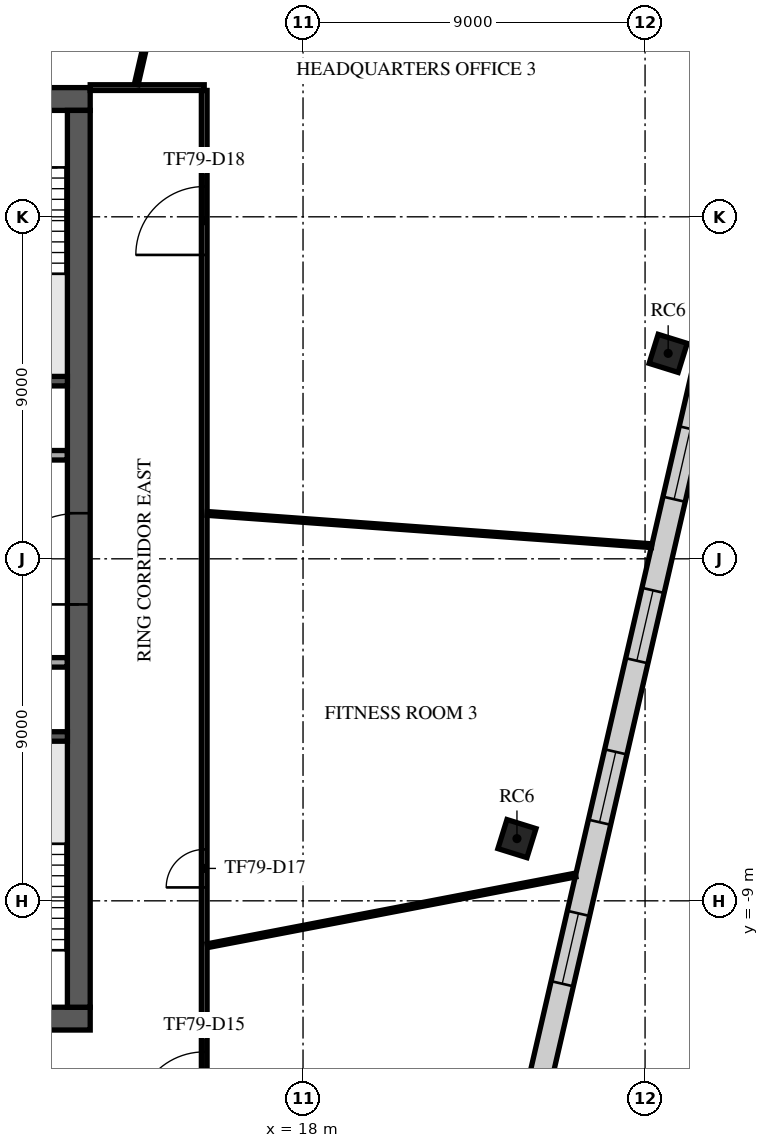
"""IFC4 building model, lengths in metres.
Left out: names, types, materials, properties, quantities, classifications, styles, units other than length and angle.
Written with IfcOpenShell. Run it as: python <this file> out.ifc"""

import sys

from ifc_helpers import new_model, si_unit, direction, frame, frame_2d, origin, origin_2d, place, context, subcontext, project, spatial, rectangle, extrude, element, fill, save


model = new_model("IFC4")
c1 = context("Model", 3, precision=1e-05, world=origin(), true_north=direction((0.0, 1.0)))
c2 = subcontext(c1, "Body", "Model", "MODEL_VIEW")
j1 = project(units=[si_unit("LENGTHUNIT", "METRE"), si_unit("PLANEANGLEUNIT", "RADIAN")], contexts=[c1])
p1 = place(None, origin())
s1 = spatial("IfcSite", under=j1, at=p1, CompositionType="ELEMENT")
p2 = place(p1, origin())
s2 = spatial("IfcBuilding", under=s1, at=p2, CompositionType="ELEMENT")
p3 = place(p2, frame((0.0, 0.0, 332.5)))
s3 = spatial("IfcBuildingStorey", under=s2, at=p3, CompositionType="ELEMENT", Elevation=332.5)
for number, where, z_axis, x_axis in (
    (1, (23.629, -7.363, 0.0), (0.0, 0.0, 1.0), (0.298, 0.955, 0.0)),
    (2, (27.608, 5.406, 0.0), (0.0, 0.0, 1.0), (0.298, 0.955, 0.0)),
):
    element("IfcColumn", number, at=place(p3, frame(where, z_axis=z_axis, x_axis=x_axis)), inside=s3, PredefinedType="COLUMN", context=c2, shape_type="SweptSolid", body=[
        extrude(rectangle(XDim=0.8, YDim=0.8, at=origin_2d()), origin(), (0.0, 0.0, 1.0), 4.0),
    ])
p4 = place(p3, frame((-12.4, 12.1, 0.0), z_axis=(0.0, 0.0, 1.0), x_axis=(1.0, 0.0, 0.0)))
e3 = element("IfcWall", 3, at=p4, inside=s3, PredefinedType="SHEAR", context=c2, shape_type="SweptSolid", body=[
    extrude(rectangle(XDim=24.8, YDim=0.6, at=frame_2d((12.4, 0.0))), origin(), (0.0, 0.0, 1.0), 3.65),
])
p5 = place(p4, frame((11.2, 0.0, 0.0)))
e4 = element("IfcOpeningElement", 4, at=p5, cuts=e3, PredefinedType="OPENING", context=c2, shape_type="SweptSolid", body=[
    extrude(rectangle(XDim=2.4, YDim=2.4, at=frame_2d((1.2, 1.2))), frame((0.0, 0.31, 0.0), z_axis=(0.0, -1.0, 0.0), x_axis=(1.0, 0.0, 0.0)), (0.0, 0.0, 1.0), 0.62),
])
p6 = place(p4, frame((22.025, 0.0, 0.0)))
e5 = element("IfcOpeningElement", 5, at=p6, cuts=e3, PredefinedType="OPENING", context=c2, shape_type="SweptSolid", body=[
    extrude(rectangle(XDim=1.2, YDim=2.1, at=frame_2d((0.6, 1.05))), frame((0.0, 0.31, 0.0), z_axis=(0.0, -1.0, 0.0), x_axis=(1.0, 0.0, 0.0)), (0.0, 0.0, 1.0), 0.62),
])
p7 = place(p4, frame((1.0, 0.0, 0.0)))
e6 = element("IfcOpeningElement", 6, at=p7, cuts=e3, PredefinedType="OPENING", context=c2, shape_type="SweptSolid", body=[
    extrude(rectangle(XDim=1.0, YDim=2.1, at=frame_2d((0.5, 1.05))), frame((0.0, 0.31, 0.0), z_axis=(0.0, -1.0, 0.0), x_axis=(1.0, 0.0, 0.0)), (0.0, 0.0, 1.0), 0.62),
])
p8 = place(p3, frame((-12.4, -12.1, 0.0), z_axis=(0.0, 0.0, 1.0), x_axis=(1.0, 0.0, 0.0)))
e7 = element("IfcWall", 7, at=p8, inside=s3, PredefinedType="SHEAR", context=c2, shape_type="SweptSolid", body=[
    extrude(rectangle(XDim=24.8, YDim=0.6, at=frame_2d((12.4, 0.0))), origin(), (0.0, 0.0, 1.0), 3.65),
])
p9 = place(p8, frame((7.3, 0.0, 0.0)))
e8 = element("IfcOpeningElement", 8, at=p9, cuts=e7, PredefinedType="OPENING", context=c2, shape_type="SweptSolid", body=[
    extrude(rectangle(XDim=2.0, YDim=2.1, at=frame_2d((1.0, 1.05))), frame((0.0, 0.31, 0.0), z_axis=(0.0, -1.0, 0.0), x_axis=(1.0, 0.0, 0.0)), (0.0, 0.0, 1.0), 0.62),
])
p10 = place(p8, frame((17.425, 0.0, 0.0)))
e9 = element("IfcOpeningElement", 9, at=p10, cuts=e7, PredefinedType="OPENING", context=c2, shape_type="SweptSolid", body=[
    extrude(rectangle(XDim=1.2, YDim=2.1, at=frame_2d((0.6, 1.05))), frame((0.0, 0.31, 0.0), z_axis=(0.0, -1.0, 0.0), x_axis=(1.0, 0.0, 0.0)), (0.0, 0.0, 1.0), 0.62),
])
p11 = place(p8, frame((1.575, 0.0, 0.0)))
e10 = element("IfcOpeningElement", 10, at=p11, cuts=e7, PredefinedType="OPENING", context=c2, shape_type="SweptSolid", body=[
    extrude(rectangle(XDim=1.2, YDim=2.1, at=frame_2d((0.6, 1.05))), frame((0.0, 0.31, 0.0), z_axis=(0.0, -1.0, 0.0), x_axis=(1.0, 0.0, 0.0)), (0.0, 0.0, 1.0), 0.62),
])
p12 = place(p8, frame((22.025, 0.0, 0.0)))
e11 = element("IfcOpeningElement", 11, at=p12, cuts=e7, PredefinedType="OPENING", context=c2, shape_type="SweptSolid", body=[
    extrude(rectangle(XDim=1.2, YDim=2.1, at=frame_2d((0.6, 1.05))), frame((0.0, 0.31, 0.0), z_axis=(0.0, -1.0, 0.0), x_axis=(1.0, 0.0, 0.0)), (0.0, 0.0, 1.0), 0.62),
])
p13 = place(p3, frame((12.1, -11.8, 0.0), z_axis=(0.0, 0.0, 1.0), x_axis=(0.0, 1.0, 0.0)))
e12 = element("IfcWall", 12, at=p13, inside=s3, PredefinedType="SHEAR", context=c2, shape_type="SweptSolid", body=[
    extrude(rectangle(XDim=23.6, YDim=0.6, at=frame_2d((11.8, 0.0))), origin(), (0.0, 0.0, 1.0), 3.65),
])
p14 = place(p13, frame((10.6, 0.0, 0.0)))
e13 = element("IfcOpeningElement", 13, at=p14, cuts=e12, PredefinedType="OPENING", context=c2, shape_type="SweptSolid", body=[
    extrude(rectangle(XDim=2.4, YDim=2.4, at=frame_2d((1.2, 1.2))), frame((0.0, 0.31, 0.0), z_axis=(0.0, -1.0, 0.0), x_axis=(1.0, 0.0, 0.0)), (0.0, 0.0, 1.0), 0.62),
])
for number, where, z_axis, x_axis in (
    (14, (8.65, 4.675, 0.0), (0.0, 0.0, 1.0), (1.0, 0.0, 0.0)),
    (15, (8.65, -4.675, 0.0), (0.0, 0.0, 1.0), (1.0, 0.0, 0.0)),
):
    element("IfcWall", number, at=place(p3, frame(where, z_axis=z_axis, x_axis=x_axis)), inside=s3, PredefinedType="SOLIDWALL", context=c2, shape_type="SweptSolid", body=[
        extrude(rectangle(XDim=3.15, YDim=0.25, at=frame_2d((1.575, 0.0))), origin(), (0.0, 0.0, 1.0), 3.65),
    ])
p15 = place(p3, frame((5.63, -2.725, 0.0), z_axis=(0.0, 0.0, 1.0), x_axis=(1.0, 0.0, 0.0)))
e16 = element("IfcWall", 16, at=p15, inside=s3, PredefinedType="PARTITIONING", context=c2, shape_type="SweptSolid", body=[
    extrude(rectangle(XDim=6.165, YDim=0.25, at=frame_2d((3.083, 0.0))), origin(), (0.0, 0.0, 1.0), 3.65),
])
p16 = place(p15, frame((0.745, 0.0, 0.0)))
e17 = element("IfcOpeningElement", 17, at=p16, cuts=e16, PredefinedType="OPENING", context=c2, shape_type="SweptSolid", body=[
    extrude(rectangle(XDim=1.0, YDim=2.1, at=frame_2d((0.5, 1.05))), frame((0.0, 0.135, 0.0), z_axis=(0.0, -1.0, 0.0), x_axis=(1.0, 0.0, 0.0)), (0.0, 0.0, 1.0), 0.27),
])
p17 = place(p15, frame((3.92, 0.0, 0.0)))
e18 = element("IfcOpeningElement", 18, at=p17, cuts=e16, PredefinedType="OPENING", context=c2, shape_type="SweptSolid", body=[
    extrude(rectangle(XDim=0.9, YDim=2.1, at=frame_2d((0.45, 1.05))), frame((0.0, 0.135, 0.0), z_axis=(0.0, -1.0, 0.0), x_axis=(1.0, 0.0, 0.0)), (0.0, 0.0, 1.0), 0.27),
])
p18 = place(p3, frame((-11.795, 2.725, 0.0), z_axis=(0.0, 0.0, 1.0), x_axis=(1.0, 0.0, 0.0)))
e19 = element("IfcWall", 19, at=p18, inside=s3, PredefinedType="PARTITIONING", context=c2, shape_type="SweptSolid", body=[
    extrude(rectangle(XDim=23.59, YDim=0.25, at=frame_2d((11.795, 0.0))), origin(), (0.0, 0.0, 1.0), 3.65),
])
p19 = place(p18, frame((21.345, 0.0, 0.0)))
e20 = element("IfcOpeningElement", 20, at=p19, cuts=e19, PredefinedType="OPENING", context=c2, shape_type="SweptSolid", body=[
    extrude(rectangle(XDim=0.9, YDim=2.1, at=frame_2d((0.45, 1.05))), frame((0.0, 0.135, 0.0), z_axis=(0.0, -1.0, 0.0), x_axis=(1.0, 0.0, 0.0)), (0.0, 0.0, 1.0), 0.27),
])
p20 = place(p18, frame((1.345, 0.0, 0.0)))
e21 = element("IfcOpeningElement", 21, at=p20, cuts=e19, PredefinedType="OPENING", context=c2, shape_type="SweptSolid", body=[
    extrude(rectangle(XDim=0.9, YDim=2.1, at=frame_2d((0.45, 1.05))), frame((0.0, 0.135, 0.0), z_axis=(0.0, -1.0, 0.0), x_axis=(1.0, 0.0, 0.0)), (0.0, 0.0, 1.0), 0.27),
])
p21 = place(p18, frame((4.42, 0.0, 0.0)))
e22 = element("IfcOpeningElement", 22, at=p21, cuts=e19, PredefinedType="OPENING", context=c2, shape_type="SweptSolid", body=[
    extrude(rectangle(XDim=1.0, YDim=2.1, at=frame_2d((0.5, 1.05))), frame((0.0, 0.135, 0.0), z_axis=(0.0, -1.0, 0.0), x_axis=(1.0, 0.0, 0.0)), (0.0, 0.0, 1.0), 0.27),
])
p22 = place(p18, frame((9.82, 0.0, 0.0)))
e23 = element("IfcOpeningElement", 23, at=p22, cuts=e19, PredefinedType="OPENING", context=c2, shape_type="SweptSolid", body=[
    extrude(rectangle(XDim=1.2, YDim=2.1, at=frame_2d((0.6, 1.05))), frame((0.0, 0.135, 0.0), z_axis=(0.0, -1.0, 0.0), x_axis=(1.0, 0.0, 0.0)), (0.0, 0.0, 1.0), 0.27),
])
p23 = place(p3, frame((20.619, -29.381, 0.0), z_axis=(0.0, 0.0, 1.0), x_axis=(0.224952041908, 0.974369836788, 0.0)))
e24 = element("IfcWall", 24, at=p23, inside=s3, PredefinedType="STANDARD", context=c2, shape_type="SweptSolid", body=[
    extrude(rectangle(XDim=47.979, YDim=0.6, at=frame_2d((23.99, 0.0))), origin(), (0.0, 0.0, 1.0), 3.65),
])
p24 = place(p23, frame((1.231, 0.0, 0.9)))
e25 = element("IfcOpeningElement", 25, at=p24, cuts=e24, PredefinedType="OPENING", context=c2, shape_type="SweptSolid", body=[
    extrude(rectangle(XDim=1.9, YDim=2.1, at=frame_2d((0.95, 1.05))), frame((0.0, 0.31, 0.0), z_axis=(0.0, -1.0, 0.0), x_axis=(1.0, 0.0, 0.0)), (0.0, 0.0, 1.0), 0.62),
])
p25 = place(p23, frame((5.593, 0.0, 0.9)))
e26 = element("IfcOpeningElement", 26, at=p25, cuts=e24, PredefinedType="OPENING", context=c2, shape_type="SweptSolid", body=[
    extrude(rectangle(XDim=1.9, YDim=2.1, at=frame_2d((0.95, 1.05))), frame((0.0, 0.31, 0.0), z_axis=(0.0, -1.0, 0.0), x_axis=(1.0, 0.0, 0.0)), (0.0, 0.0, 1.0), 0.62),
])
p26 = place(p23, frame((9.954, 0.0, 0.9)))
e27 = element("IfcOpeningElement", 27, at=p26, cuts=e24, PredefinedType="OPENING", context=c2, shape_type="SweptSolid", body=[
    extrude(rectangle(XDim=1.9, YDim=2.1, at=frame_2d((0.95, 1.05))), frame((0.0, 0.31, 0.0), z_axis=(0.0, -1.0, 0.0), x_axis=(1.0, 0.0, 0.0)), (0.0, 0.0, 1.0), 0.62),
])
p27 = place(p23, frame((14.316, 0.0, 0.9)))
e28 = element("IfcOpeningElement", 28, at=p27, cuts=e24, PredefinedType="OPENING", context=c2, shape_type="SweptSolid", body=[
    extrude(rectangle(XDim=1.9, YDim=2.1, at=frame_2d((0.95, 1.05))), frame((0.0, 0.31, 0.0), z_axis=(0.0, -1.0, 0.0), x_axis=(1.0, 0.0, 0.0)), (0.0, 0.0, 1.0), 0.62),
])
p28 = place(p23, frame((18.678, 0.0, 0.9)))
e29 = element("IfcOpeningElement", 29, at=p28, cuts=e24, PredefinedType="OPENING", context=c2, shape_type="SweptSolid", body=[
    extrude(rectangle(XDim=1.9, YDim=2.1, at=frame_2d((0.95, 1.05))), frame((0.0, 0.31, 0.0), z_axis=(0.0, -1.0, 0.0), x_axis=(1.0, 0.0, 0.0)), (0.0, 0.0, 1.0), 0.62),
])
p29 = place(p23, frame((23.04, 0.0, 0.9)))
e30 = element("IfcOpeningElement", 30, at=p29, cuts=e24, PredefinedType="OPENING", context=c2, shape_type="SweptSolid", body=[
    extrude(rectangle(XDim=1.9, YDim=2.1, at=frame_2d((0.95, 1.05))), frame((0.0, 0.31, 0.0), z_axis=(0.0, -1.0, 0.0), x_axis=(1.0, 0.0, 0.0)), (0.0, 0.0, 1.0), 0.62),
])
p30 = place(p23, frame((27.401, 0.0, 0.9)))
e31 = element("IfcOpeningElement", 31, at=p30, cuts=e24, PredefinedType="OPENING", context=c2, shape_type="SweptSolid", body=[
    extrude(rectangle(XDim=1.9, YDim=2.1, at=frame_2d((0.95, 1.05))), frame((0.0, 0.31, 0.0), z_axis=(0.0, -1.0, 0.0), x_axis=(1.0, 0.0, 0.0)), (0.0, 0.0, 1.0), 0.62),
])
p31 = place(p23, frame((31.763, 0.0, 0.9)))
e32 = element("IfcOpeningElement", 32, at=p31, cuts=e24, PredefinedType="OPENING", context=c2, shape_type="SweptSolid", body=[
    extrude(rectangle(XDim=1.9, YDim=2.1, at=frame_2d((0.95, 1.05))), frame((0.0, 0.31, 0.0), z_axis=(0.0, -1.0, 0.0), x_axis=(1.0, 0.0, 0.0)), (0.0, 0.0, 1.0), 0.62),
])
p32 = place(p23, frame((36.125, 0.0, 0.9)))
e33 = element("IfcOpeningElement", 33, at=p32, cuts=e24, PredefinedType="OPENING", context=c2, shape_type="SweptSolid", body=[
    extrude(rectangle(XDim=1.9, YDim=2.1, at=frame_2d((0.95, 1.05))), frame((0.0, 0.31, 0.0), z_axis=(0.0, -1.0, 0.0), x_axis=(1.0, 0.0, 0.0)), (0.0, 0.0, 1.0), 0.62),
])
p33 = place(p23, frame((40.487, 0.0, 0.9)))
e34 = element("IfcOpeningElement", 34, at=p33, cuts=e24, PredefinedType="OPENING", context=c2, shape_type="SweptSolid", body=[
    extrude(rectangle(XDim=1.9, YDim=2.1, at=frame_2d((0.95, 1.05))), frame((0.0, 0.31, 0.0), z_axis=(0.0, -1.0, 0.0), x_axis=(1.0, 0.0, 0.0)), (0.0, 0.0, 1.0), 0.62),
])
p34 = place(p23, frame((44.848, 0.0, 0.9)))
e35 = element("IfcOpeningElement", 35, at=p34, cuts=e24, PredefinedType="OPENING", context=c2, shape_type="SweptSolid", body=[
    extrude(rectangle(XDim=1.9, YDim=2.1, at=frame_2d((0.95, 1.05))), frame((0.0, 0.31, 0.0), z_axis=(0.0, -1.0, 0.0), x_axis=(1.0, 0.0, 0.0)), (0.0, 0.0, 1.0), 0.62),
])
p35 = place(p3, frame((12.4, 12.4, 0.0), z_axis=(0.0, 0.0, 1.0), x_axis=(1.0, 0.0, 0.0)))
e36 = element("IfcWall", 36, at=p35, inside=s3, PredefinedType="PARTITIONING", context=c2, shape_type="SweptSolid", body=[
    extrude(rectangle(XDim=3.0, YDim=0.15, at=frame_2d((1.5, 0.0))), origin(), (0.0, 0.0, 1.0), 3.13),
])
p36 = place(p3, frame((15.4, -15.325, 0.0), z_axis=(0.0, 0.0, 1.0), x_axis=(0.0, 1.0, 0.0)))
e37 = element("IfcWall", 37, at=p36, inside=s3, PredefinedType="PARTITIONING", context=c2, shape_type="SweptSolid", body=[
    extrude(rectangle(XDim=27.65, YDim=0.15, at=frame_2d((13.825, 0.0))), origin(), (0.0, 0.0, 1.0), 3.25),
])
p37 = place(p36, frame((0.55, 0.0, 0.0)))
e38 = element("IfcOpeningElement", 38, at=p37, cuts=e37, PredefinedType="OPENING", context=c2, shape_type="SweptSolid", body=[
    extrude(rectangle(XDim=1.8, YDim=2.1, at=frame_2d((0.9, 1.05))), frame((0.0, 0.085, 0.0), z_axis=(0.0, -1.0, 0.0), x_axis=(1.0, 0.0, 0.0)), (0.0, 0.0, 1.0), 0.17),
])
p38 = place(p36, frame((6.678, 0.0, 0.0)))
e39 = element("IfcOpeningElement", 39, at=p38, cuts=e37, PredefinedType="OPENING", context=c2, shape_type="SweptSolid", body=[
    extrude(rectangle(XDim=1.0, YDim=2.1, at=frame_2d((0.5, 1.05))), frame((0.0, 0.085, 0.0), z_axis=(0.0, -1.0, 0.0), x_axis=(1.0, 0.0, 0.0)), (0.0, 0.0, 1.0), 0.17),
])
p39 = place(p36, frame((23.322, 0.0, 0.0)))
e40 = element("IfcOpeningElement", 40, at=p39, cuts=e37, PredefinedType="OPENING", context=c2, shape_type="SweptSolid", body=[
    extrude(rectangle(XDim=1.8, YDim=2.1, at=frame_2d((0.9, 1.05))), frame((0.0, 0.085, 0.0), z_axis=(0.0, -1.0, 0.0), x_axis=(1.0, 0.0, 0.0)), (0.0, 0.0, 1.0), 0.17),
])
p40 = place(p3, frame((13.612, 12.486, 0.0), z_axis=(0.0, 0.0, 1.0), x_axis=(0.224788589714, 0.974407558435, 0.0)))
e41 = element("IfcWall", 41, at=p40, inside=s3, PredefinedType="PARTITIONING", context=c2, shape_type="SweptSolid", body=[
    extrude(rectangle(XDim=4.023, YDim=0.1, at=frame_2d((2.011, 0.0))), origin(), (0.0, 0.0, 1.0), 3.25),
])
p41 = place(p3, frame((15.484, -10.181, 0.0), z_axis=(0.0, 0.0, 1.0), x_axis=(0.982063248181, 0.188551787506, 0.0)))
e42 = element("IfcWall", 42, at=p41, inside=s3, PredefinedType="PARTITIONING", context=c2, shape_type="SweptSolid", body=[
    extrude(rectangle(XDim=9.864, YDim=0.1, at=frame_2d((4.932, 0.0))), origin(), (0.0, 0.0, 1.0), 3.05),
])
p42 = place(p3, frame((15.479, 1.194, 0.0), z_axis=(0.0, 0.0, 1.0), x_axis=(0.997373972888, -0.07242346447, 0.0)))
e43 = element("IfcWall", 43, at=p42, inside=s3, PredefinedType="PARTITIONING", context=c2, shape_type="SweptSolid", body=[
    extrude(rectangle(XDim=11.724, YDim=0.1, at=frame_2d((5.862, 0.0))), origin(), (0.0, 0.0, 1.0), 3.05),
])
p43 = place(p14, origin())
e44 = element("IfcDoor", 44, at=p43, inside=s3, OperationType="SINGLE_SWING_LEFT", PredefinedType="DOOR", context=c2, shape_type="SweptSolid", body=[
    extrude(rectangle(XDim=2.4, YDim=2.4, at=frame_2d((1.2, 1.2))), frame((0.0, 0.025, 0.0), z_axis=(0.0, -1.0, 0.0), x_axis=(1.0, 0.0, 0.0)), (0.0, 0.0, 1.0), 0.05),
])
fill(e13, e44)
p44 = place(p28, origin())
e45 = element("IfcWindow", 45, at=p44, inside=s3, PartitioningType="SINGLE_PANEL", PredefinedType="WINDOW", context=c2, shape_type="SweptSolid", body=[
    extrude(rectangle(XDim=1.9, YDim=2.1, at=frame_2d((0.95, 1.05))), frame((0.0, 0.03, 0.0), z_axis=(0.0, -1.0, 0.0), x_axis=(1.0, 0.0, 0.0)), (0.0, 0.0, 1.0), 0.06),
])
fill(e29, e45)
p45 = place(p29, origin())
e46 = element("IfcWindow", 46, at=p45, inside=s3, PartitioningType="SINGLE_PANEL", PredefinedType="WINDOW", context=c2, shape_type="SweptSolid", body=[
    extrude(rectangle(XDim=1.9, YDim=2.1, at=frame_2d((0.95, 1.05))), frame((0.0, 0.03, 0.0), z_axis=(0.0, -1.0, 0.0), x_axis=(1.0, 0.0, 0.0)), (0.0, 0.0, 1.0), 0.06),
])
fill(e30, e46)
p46 = place(p30, origin())
e47 = element("IfcWindow", 47, at=p46, inside=s3, PartitioningType="SINGLE_PANEL", PredefinedType="WINDOW", context=c2, shape_type="SweptSolid", body=[
    extrude(rectangle(XDim=1.9, YDim=2.1, at=frame_2d((0.95, 1.05))), frame((0.0, 0.03, 0.0), z_axis=(0.0, -1.0, 0.0), x_axis=(1.0, 0.0, 0.0)), (0.0, 0.0, 1.0), 0.06),
])
fill(e31, e47)
p47 = place(p31, origin())
e48 = element("IfcWindow", 48, at=p47, inside=s3, PartitioningType="SINGLE_PANEL", PredefinedType="WINDOW", context=c2, shape_type="SweptSolid", body=[
    extrude(rectangle(XDim=1.9, YDim=2.1, at=frame_2d((0.95, 1.05))), frame((0.0, 0.03, 0.0), z_axis=(0.0, -1.0, 0.0), x_axis=(1.0, 0.0, 0.0)), (0.0, 0.0, 1.0), 0.06),
])
fill(e32, e48)
p48 = place(p37, frame((1.8, 0.0, 0.0), z_axis=(0.0, 0.0, 1.0), x_axis=(-1.0, 0.0, 0.0)))
e49 = element("IfcDoor", 49, at=p48, inside=s3, OperationType="DOUBLE_DOOR_SINGLE_SWING", PredefinedType="DOOR", context=c2, shape_type="SweptSolid", body=[
    extrude(rectangle(XDim=1.8, YDim=2.1, at=frame_2d((0.9, 1.05))), frame((0.0, 0.025, 0.0), z_axis=(0.0, -1.0, 0.0), x_axis=(1.0, 0.0, 0.0)), (0.0, 0.0, 1.0), 0.05),
])
fill(e38, e49)
p49 = place(p38, frame((1.0, 0.0, 0.0), z_axis=(0.0, 0.0, 1.0), x_axis=(-1.0, 0.0, 0.0)))
e50 = element("IfcDoor", 50, at=p49, inside=s3, OperationType="SINGLE_SWING_LEFT", PredefinedType="DOOR", context=c2, shape_type="SweptSolid", body=[
    extrude(rectangle(XDim=1.0, YDim=2.1, at=frame_2d((0.5, 1.05))), frame((0.0, 0.025, 0.0), z_axis=(0.0, -1.0, 0.0), x_axis=(1.0, 0.0, 0.0)), (0.0, 0.0, 1.0), 0.05),
])
fill(e39, e50)
p50 = place(p39, frame((1.8, 0.0, 0.0), z_axis=(0.0, 0.0, 1.0), x_axis=(-1.0, 0.0, 0.0)))
e51 = element("IfcDoor", 51, at=p50, inside=s3, OperationType="DOUBLE_DOOR_SINGLE_SWING", PredefinedType="DOOR", context=c2, shape_type="SweptSolid", body=[
    extrude(rectangle(XDim=1.8, YDim=2.1, at=frame_2d((0.9, 1.05))), frame((0.0, 0.025, 0.0), z_axis=(0.0, -1.0, 0.0), x_axis=(1.0, 0.0, 0.0)), (0.0, 0.0, 1.0), 0.05),
])
fill(e40, e51)
save(model, sys.argv[1])
